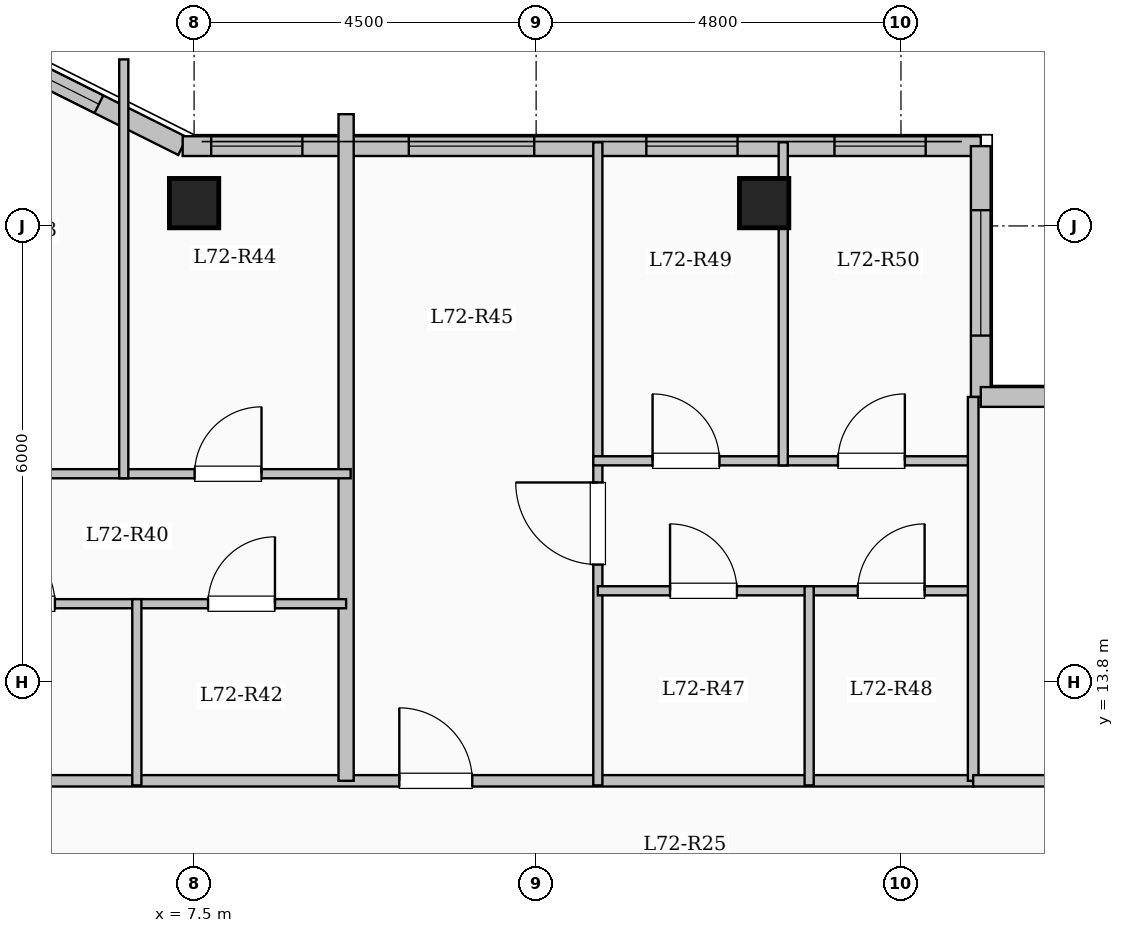
"""IFC4 building model, lengths in metres.
Left out: names, types, materials, properties, quantities, classifications, styles, units other than length and angle.
Written with IfcOpenShell. Run it as: python <this file> out.ifc"""

import sys

from ifc_helpers import new_model, si_unit, direction, frame, frame_2d, origin, origin_2d, place, context, subcontext, project, spatial, rectangle, extrude, element, fill, save


model = new_model("IFC4")
c1 = context("Model", 3, precision=1e-05, world=origin(), true_north=direction((0.0, 1.0)))
c2 = subcontext(c1, "Body", "Model", "MODEL_VIEW")
j1 = project(units=[si_unit("LENGTHUNIT", "METRE"), si_unit("PLANEANGLEUNIT", "RADIAN")], contexts=[c1])
p1 = place(None, origin())
s1 = spatial("IfcSite", under=j1, at=p1, CompositionType="ELEMENT")
p2 = place(p1, origin())
s2 = spatial("IfcBuilding", under=s1, at=p2, CompositionType="ELEMENT")
p3 = place(p2, frame((0.0, 0.0, 264.95)))
s3 = spatial("IfcBuildingStorey", under=s2, at=p3, CompositionType="ELEMENT", Elevation=264.95)
for number, where, z_axis, x_axis in (
    (1, (7.5, 20.1, 0.0), (0.0, 0.0, 1.0), (1.0, 0.0, 0.0)),
    (2, (15.0, 20.1, 0.0), (0.0, 0.0, 1.0), (1.0, 0.0, 0.0)),
):
    element("IfcColumn", number, at=place(p3, frame(where, z_axis=z_axis, x_axis=x_axis)), inside=s3, PredefinedType="COLUMN", context=c2, shape_type="SweptSolid", body=[
        extrude(rectangle(XDim=0.65, YDim=0.65, at=origin_2d()), origin(), (0.0, 0.0, 1.0), 3.35),
    ])
p4 = place(p3, frame((4.35, 22.35, 0.0), z_axis=(0.0, 0.0, 1.0), x_axis=(0.894427191, -0.4472135955, 0.0)))
e3 = element("IfcWall", 3, at=p4, inside=s3, PredefinedType="SOLIDWALL", context=c2, shape_type="SweptSolid", body=[
    extrude(rectangle(XDim=3.354, YDim=0.26, at=frame_2d((1.677, 0.0))), origin(), (0.0, 0.0, 1.0), 3.1),
])
p5 = place(p4, frame((0.772, 0.0, 0.95)))
e4 = element("IfcOpeningElement", 4, at=p5, cuts=e3, PredefinedType="OPENING", context=c2, shape_type="SweptSolid", body=[
    extrude(rectangle(XDim=1.35, YDim=1.55, at=frame_2d((0.675, 0.775))), frame((0.0, 0.14, 0.0), z_axis=(0.0, -1.0, 0.0), x_axis=(1.0, 0.0, 0.0)), (0.0, 0.0, 1.0), 0.28),
])
p6 = place(p3, frame((7.35, 20.85, 0.0), z_axis=(0.0, 0.0, 1.0), x_axis=(1.0, 0.0, 0.0)))
e5 = element("IfcWall", 5, at=p6, inside=s3, PredefinedType="SOLIDWALL", context=c2, shape_type="SweptSolid", body=[
    extrude(rectangle(XDim=10.5, YDim=0.26, at=frame_2d((5.25, 0.0))), origin(), (0.0, 0.0, 1.0), 3.1),
])
p7 = place(p6, frame((0.375, 0.0, 0.95)))
e6 = element("IfcOpeningElement", 6, at=p7, cuts=e5, PredefinedType="OPENING", context=c2, shape_type="SweptSolid", body=[
    extrude(rectangle(XDim=1.2, YDim=1.5, at=frame_2d((0.6, 0.75))), frame((0.0, 0.14, 0.0), z_axis=(0.0, -1.0, 0.0), x_axis=(1.0, 0.0, 0.0)), (0.0, 0.0, 1.0), 0.28),
])
p8 = place(p6, frame((2.975, 0.0, 0.9)))
e7 = element("IfcOpeningElement", 7, at=p8, cuts=e5, PredefinedType="OPENING", context=c2, shape_type="SweptSolid", body=[
    extrude(rectangle(XDim=1.65, YDim=1.6, at=frame_2d((0.825, 0.8))), frame((0.0, 0.14, 0.0), z_axis=(0.0, -1.0, 0.0), x_axis=(1.0, 0.0, 0.0)), (0.0, 0.0, 1.0), 0.28),
])
p9 = place(p6, frame((6.1, 0.0, 0.95)))
e8 = element("IfcOpeningElement", 8, at=p9, cuts=e5, PredefinedType="OPENING", context=c2, shape_type="SweptSolid", body=[
    extrude(rectangle(XDim=1.2, YDim=1.5, at=frame_2d((0.6, 0.75))), frame((0.0, 0.14, 0.0), z_axis=(0.0, -1.0, 0.0), x_axis=(1.0, 0.0, 0.0)), (0.0, 0.0, 1.0), 0.28),
])
p10 = place(p6, frame((8.575, 0.0, 0.95)))
e9 = element("IfcOpeningElement", 9, at=p10, cuts=e5, PredefinedType="OPENING", context=c2, shape_type="SweptSolid", body=[
    extrude(rectangle(XDim=1.2, YDim=1.5, at=frame_2d((0.6, 0.75))), frame((0.0, 0.14, 0.0), z_axis=(0.0, -1.0, 0.0), x_axis=(1.0, 0.0, 0.0)), (0.0, 0.0, 1.0), 0.28),
])
p11 = place(p3, frame((17.85, 20.85, 0.0), z_axis=(0.0, 0.0, 1.0), x_axis=(0.0, -1.0, 0.0)))
e10 = element("IfcWall", 10, at=p11, inside=s3, PredefinedType="SOLIDWALL", context=c2, shape_type="SweptSolid", body=[
    extrude(rectangle(XDim=3.3, YDim=0.26, at=frame_2d((1.65, 0.0))), origin(), (0.0, 0.0, 1.0), 3.1),
])
p12 = place(p11, frame((0.843, 0.0, 0.9)))
e11 = element("IfcOpeningElement", 11, at=p12, cuts=e10, PredefinedType="OPENING", context=c2, shape_type="SweptSolid", body=[
    extrude(rectangle(XDim=1.65, YDim=1.6, at=frame_2d((0.825, 0.8))), frame((0.0, 0.14, 0.0), z_axis=(0.0, -1.0, 0.0), x_axis=(1.0, 0.0, 0.0)), (0.0, 0.0, 1.0), 0.28),
])
p13 = place(p3, frame((17.85, 17.55, 0.0), z_axis=(0.0, 0.0, 1.0), x_axis=(1.0, 0.0, 0.0)))
e12 = element("IfcWall", 12, at=p13, inside=s3, PredefinedType="SOLIDWALL", context=c2, shape_type="SweptSolid", body=[
    extrude(rectangle(XDim=4.8, YDim=0.26, at=frame_2d((2.4, 0.0))), origin(), (0.0, 0.0, 1.0), 3.1),
])
p14 = place(p13, frame((1.375, 0.0, 0.9)))
e13 = element("IfcOpeningElement", 13, at=p14, cuts=e12, PredefinedType="OPENING", context=c2, shape_type="SweptSolid", body=[
    extrude(rectangle(XDim=2.0, YDim=1.7, at=frame_2d((1.0, 0.85))), frame((0.0, 0.14, 0.0), z_axis=(0.0, -1.0, 0.0), x_axis=(1.0, 0.0, 0.0)), (0.0, 0.0, 1.0), 0.28),
])
p15 = place(p3, frame((3.85, 12.5, 0.0), z_axis=(0.0, 0.0, 1.0), x_axis=(1.0, 0.0, 0.0)))
e14 = element("IfcWall", 14, at=p15, inside=s3, PredefinedType="PARTITIONING", context=c2, shape_type="SweptSolid", body=[
    extrude(rectangle(XDim=13.9, YDim=0.15, at=frame_2d((6.95, 0.0))), origin(), (0.0, 0.0, 1.0), 3.1),
])
p16 = place(p15, frame((0.7, 0.0, 0.0)))
e15 = element("IfcOpeningElement", 15, at=p16, cuts=e14, PredefinedType="OPENING", context=c2, shape_type="SweptSolid", body=[
    extrude(rectangle(XDim=0.96, YDim=2.15, at=frame_2d((0.48, 1.075))), frame((0.0, 0.085, 0.0), z_axis=(0.0, -1.0, 0.0), x_axis=(1.0, 0.0, 0.0)), (0.0, 0.0, 1.0), 0.17),
])
p17 = place(p15, frame((6.35, 0.0, 0.0)))
e16 = element("IfcOpeningElement", 16, at=p17, cuts=e14, PredefinedType="OPENING", context=c2, shape_type="SweptSolid", body=[
    extrude(rectangle(XDim=0.96, YDim=2.15, at=frame_2d((0.48, 1.075))), frame((0.0, 0.085, 0.0), z_axis=(0.0, -1.0, 0.0), x_axis=(1.0, 0.0, 0.0)), (0.0, 0.0, 1.0), 0.17),
])
p18 = place(p3, frame((9.5, 12.5, 0.0), z_axis=(0.0, 0.0, 1.0), x_axis=(0.0, 1.0, 0.0)))
e17 = element("IfcWall", 17, at=p18, inside=s3, PredefinedType="SOLIDWALL", context=c2, shape_type="SweptSolid", body=[
    extrude(rectangle(XDim=8.77, YDim=0.2, at=frame_2d((4.385, 0.0))), origin(), (0.0, 0.0, 1.0), 3.1),
])
p19 = place(p3, frame((3.71, 14.83, 0.0), z_axis=(0.0, 0.0, 1.0), x_axis=(1.0, 0.0, 0.0)))
e18 = element("IfcWall", 18, at=p19, inside=s3, PredefinedType="PARTITIONING", context=c2, shape_type="SweptSolid", body=[
    extrude(rectangle(XDim=3.037, YDim=0.12, at=frame_2d((1.519, 0.0))), origin(), (0.0, 0.0, 1.0), 3.1),
])
p20 = place(p19, frame((1.079, 0.0, 0.0)))
e19 = element("IfcOpeningElement", 19, at=p20, cuts=e18, PredefinedType="OPENING", context=c2, shape_type="SweptSolid", body=[
    extrude(rectangle(XDim=0.88, YDim=2.1, at=frame_2d((0.44, 1.05))), frame((0.0, 0.07, 0.0), z_axis=(0.0, -1.0, 0.0), x_axis=(1.0, 0.0, 0.0)), (0.0, 0.0, 1.0), 0.14),
])
p21 = place(p3, frame((6.747, 14.83, 0.0), z_axis=(0.0, 0.0, 1.0), x_axis=(1.0, 0.0, 0.0)))
e20 = element("IfcWall", 20, at=p21, inside=s3, PredefinedType="PARTITIONING", context=c2, shape_type="SweptSolid", body=[
    extrude(rectangle(XDim=2.753, YDim=0.12, at=frame_2d((1.376, 0.0))), origin(), (0.0, 0.0, 1.0), 3.1),
])
p22 = place(p21, frame((0.937, 0.0, 0.0)))
e21 = element("IfcOpeningElement", 21, at=p22, cuts=e20, PredefinedType="OPENING", context=c2, shape_type="SweptSolid", body=[
    extrude(rectangle(XDim=0.88, YDim=2.1, at=frame_2d((0.44, 1.05))), frame((0.0, 0.07, 0.0), z_axis=(0.0, -1.0, 0.0), x_axis=(1.0, 0.0, 0.0)), (0.0, 0.0, 1.0), 0.14),
])
p23 = place(p3, frame((3.65, 16.54, 0.0), z_axis=(0.0, 0.0, 1.0), x_axis=(1.0, 0.0, 0.0)))
e22 = element("IfcWall", 22, at=p23, inside=s3, PredefinedType="PARTITIONING", context=c2, shape_type="SweptSolid", body=[
    extrude(rectangle(XDim=5.91, YDim=0.12, at=frame_2d((2.955, 0.0))), origin(), (0.0, 0.0, 1.0), 3.1),
])
p24 = place(p23, frame((0.992, 0.0, 0.0)))
e23 = element("IfcOpeningElement", 23, at=p24, cuts=e22, PredefinedType="OPENING", context=c2, shape_type="SweptSolid", body=[
    extrude(rectangle(XDim=0.88, YDim=2.1, at=frame_2d((0.44, 1.05))), frame((0.0, 0.07, 0.0), z_axis=(0.0, -1.0, 0.0), x_axis=(1.0, 0.0, 0.0)), (0.0, 0.0, 1.0), 0.14),
])
p25 = place(p23, frame((3.857, 0.0, 0.0)))
e24 = element("IfcOpeningElement", 24, at=p25, cuts=e22, PredefinedType="OPENING", context=c2, shape_type="SweptSolid", body=[
    extrude(rectangle(XDim=0.88, YDim=2.1, at=frame_2d((0.44, 1.05))), frame((0.0, 0.07, 0.0), z_axis=(0.0, -1.0, 0.0), x_axis=(1.0, 0.0, 0.0)), (0.0, 0.0, 1.0), 0.14),
])
p26 = place(p3, frame((6.747, 12.44, 0.0), z_axis=(0.0, 0.0, 1.0), x_axis=(0.0, 1.0, 0.0)))
e25 = element("IfcWall", 25, at=p26, inside=s3, PredefinedType="PARTITIONING", context=c2, shape_type="SweptSolid", body=[
    extrude(rectangle(XDim=2.45, YDim=0.12, at=frame_2d((1.225, 0.0))), origin(), (0.0, 0.0, 1.0), 3.1),
])
p27 = place(p3, frame((6.575, 16.48, 0.0), z_axis=(0.0, 0.0, 1.0), x_axis=(0.0, 1.0, 0.0)))
e26 = element("IfcWall", 26, at=p27, inside=s3, PredefinedType="PARTITIONING", context=c2, shape_type="SweptSolid", body=[
    extrude(rectangle(XDim=5.511, YDim=0.12, at=frame_2d((2.755, 0.0))), origin(), (0.0, 0.0, 1.0), 3.1),
])
p28 = place(p3, frame((12.812, 12.44, 0.0), z_axis=(0.0, 0.0, 1.0), x_axis=(0.0, 1.0, 0.0)))
e27 = element("IfcWall", 27, at=p28, inside=s3, PredefinedType="PARTITIONING", context=c2, shape_type="SweptSolid", body=[
    extrude(rectangle(XDim=8.46, YDim=0.12, at=frame_2d((4.23, 0.0))), origin(), (0.0, 0.0, 1.0), 3.1),
])
p29 = place(p28, frame((2.905, 0.0, 0.0)))
e28 = element("IfcOpeningElement", 28, at=p29, cuts=e27, PredefinedType="OPENING", context=c2, shape_type="SweptSolid", body=[
    extrude(rectangle(XDim=1.08, YDim=2.15, at=frame_2d((0.54, 1.075))), frame((0.0, 0.07, 0.0), z_axis=(0.0, -1.0, 0.0), x_axis=(1.0, 0.0, 0.0)), (0.0, 0.0, 1.0), 0.14),
])
p30 = place(p3, frame((12.812, 15.0, 0.0), z_axis=(0.0, 0.0, 1.0), x_axis=(1.0, 0.0, 0.0)))
e29 = element("IfcWall", 29, at=p30, inside=s3, PredefinedType="PARTITIONING", context=c2, shape_type="SweptSolid", body=[
    extrude(rectangle(XDim=2.78, YDim=0.12, at=frame_2d((1.39, 0.0))), origin(), (0.0, 0.0, 1.0), 3.1),
])
p31 = place(p30, frame((0.95, 0.0, 0.0)))
e30 = element("IfcOpeningElement", 30, at=p31, cuts=e29, PredefinedType="OPENING", context=c2, shape_type="SweptSolid", body=[
    extrude(rectangle(XDim=0.88, YDim=2.1, at=frame_2d((0.44, 1.05))), frame((0.0, 0.07, 0.0), z_axis=(0.0, -1.0, 0.0), x_axis=(1.0, 0.0, 0.0)), (0.0, 0.0, 1.0), 0.14),
])
p32 = place(p3, frame((15.592, 15.0, 0.0), z_axis=(0.0, 0.0, 1.0), x_axis=(1.0, 0.0, 0.0)))
e31 = element("IfcWall", 31, at=p32, inside=s3, PredefinedType="PARTITIONING", context=c2, shape_type="SweptSolid", body=[
    extrude(rectangle(XDim=2.158, YDim=0.12, at=frame_2d((1.079, 0.0))), origin(), (0.0, 0.0, 1.0), 3.1),
])
p33 = place(p32, frame((0.639, 0.0, 0.0)))
e32 = element("IfcOpeningElement", 32, at=p33, cuts=e31, PredefinedType="OPENING", context=c2, shape_type="SweptSolid", body=[
    extrude(rectangle(XDim=0.88, YDim=2.1, at=frame_2d((0.44, 1.05))), frame((0.0, 0.07, 0.0), z_axis=(0.0, -1.0, 0.0), x_axis=(1.0, 0.0, 0.0)), (0.0, 0.0, 1.0), 0.14),
])
p34 = place(p3, frame((12.752, 16.71, 0.0), z_axis=(0.0, 0.0, 1.0), x_axis=(1.0, 0.0, 0.0)))
e33 = element("IfcWall", 33, at=p34, inside=s3, PredefinedType="PARTITIONING", context=c2, shape_type="SweptSolid", body=[
    extrude(rectangle(XDim=5.058, YDim=0.12, at=frame_2d((2.529, 0.0))), origin(), (0.0, 0.0, 1.0), 2.785),
])
p35 = place(p34, frame((0.78, 0.0, 0.0)))
e34 = element("IfcOpeningElement", 34, at=p35, cuts=e33, PredefinedType="OPENING", context=c2, shape_type="SweptSolid", body=[
    extrude(rectangle(XDim=0.88, YDim=2.1, at=frame_2d((0.44, 1.05))), frame((0.0, 0.07, 0.0), z_axis=(0.0, -1.0, 0.0), x_axis=(1.0, 0.0, 0.0)), (0.0, 0.0, 1.0), 0.14),
])
p36 = place(p34, frame((3.219, 0.0, 0.0)))
e35 = element("IfcOpeningElement", 35, at=p36, cuts=e33, PredefinedType="OPENING", context=c2, shape_type="SweptSolid", body=[
    extrude(rectangle(XDim=0.88, YDim=2.1, at=frame_2d((0.44, 1.05))), frame((0.0, 0.07, 0.0), z_axis=(0.0, -1.0, 0.0), x_axis=(1.0, 0.0, 0.0)), (0.0, 0.0, 1.0), 0.14),
])
p37 = place(p3, frame((15.592, 12.44, 0.0), z_axis=(0.0, 0.0, 1.0), x_axis=(0.0, 1.0, 0.0)))
e36 = element("IfcWall", 36, at=p37, inside=s3, PredefinedType="PARTITIONING", context=c2, shape_type="SweptSolid", body=[
    extrude(rectangle(XDim=2.62, YDim=0.12, at=frame_2d((1.31, 0.0))), origin(), (0.0, 0.0, 1.0), 3.1),
])
p38 = place(p3, frame((15.251, 16.65, 0.0), z_axis=(0.0, 0.0, 1.0), x_axis=(0.0, 1.0, 0.0)))
e37 = element("IfcWall", 37, at=p38, inside=s3, PredefinedType="PARTITIONING", context=c2, shape_type="SweptSolid", body=[
    extrude(rectangle(XDim=4.25, YDim=0.12, at=frame_2d((2.125, 0.0))), origin(), (0.0, 0.0, 1.0), 2.685),
])
p39 = place(p3, frame((17.75, 12.5, 0.0), z_axis=(0.0, 0.0, 1.0), x_axis=(0.0, 1.0, 0.0)))
e38 = element("IfcWall", 38, at=p39, inside=s3, PredefinedType="PARTITIONING", context=c2, shape_type="SweptSolid", body=[
    extrude(rectangle(XDim=5.05, YDim=0.14, at=frame_2d((2.525, 0.0))), origin(), (0.0, 0.0, 1.0), 3.1),
])
p40 = place(p3, frame((17.75, 12.5, 0.0), z_axis=(0.0, 0.0, 1.0), x_axis=(1.0, 0.0, 0.0)))
e39 = element("IfcWall", 39, at=p40, inside=s3, PredefinedType="PARTITIONING", context=c2, shape_type="SweptSolid", body=[
    extrude(rectangle(XDim=4.93, YDim=0.15, at=frame_2d((2.465, 0.0))), origin(), (0.0, 0.0, 1.0), 3.1),
])
p41 = place(p40, frame((1.99, 0.0, 0.0)))
e40 = element("IfcOpeningElement", 40, at=p41, cuts=e39, PredefinedType="OPENING", context=c2, shape_type="SweptSolid", body=[
    extrude(rectangle(XDim=0.95, YDim=2.15, at=frame_2d((0.475, 1.075))), frame((0.0, 0.085, 0.0), z_axis=(0.0, -1.0, 0.0), x_axis=(1.0, 0.0, 0.0)), (0.0, 0.0, 1.0), 0.17),
])
p42 = place(p5, origin())
e41 = element("IfcWindow", 41, at=p42, inside=s3, PartitioningType="SINGLE_PANEL", PredefinedType="WINDOW", context=c2, shape_type="SweptSolid", body=[
    extrude(rectangle(XDim=1.35, YDim=1.55, at=frame_2d((0.675, 0.775))), frame((0.0, 0.03, 0.0), z_axis=(0.0, -1.0, 0.0), x_axis=(1.0, 0.0, 0.0)), (0.0, 0.0, 1.0), 0.06),
])
fill(e4, e41)
p43 = place(p7, origin())
e42 = element("IfcWindow", 42, at=p43, inside=s3, PartitioningType="SINGLE_PANEL", PredefinedType="WINDOW", context=c2, shape_type="SweptSolid", body=[
    extrude(rectangle(XDim=1.2, YDim=1.5, at=frame_2d((0.6, 0.75))), frame((0.0, 0.03, 0.0), z_axis=(0.0, -1.0, 0.0), x_axis=(1.0, 0.0, 0.0)), (0.0, 0.0, 1.0), 0.06),
])
fill(e6, e42)
p44 = place(p8, origin())
e43 = element("IfcWindow", 43, at=p44, inside=s3, PartitioningType="SINGLE_PANEL", PredefinedType="WINDOW", context=c2, shape_type="SweptSolid", body=[
    extrude(rectangle(XDim=1.65, YDim=1.6, at=frame_2d((0.825, 0.8))), frame((0.0, 0.03, 0.0), z_axis=(0.0, -1.0, 0.0), x_axis=(1.0, 0.0, 0.0)), (0.0, 0.0, 1.0), 0.06),
])
fill(e7, e43)
p45 = place(p9, origin())
e44 = element("IfcWindow", 44, at=p45, inside=s3, PartitioningType="SINGLE_PANEL", PredefinedType="WINDOW", context=c2, shape_type="SweptSolid", body=[
    extrude(rectangle(XDim=1.2, YDim=1.5, at=frame_2d((0.6, 0.75))), frame((0.0, 0.03, 0.0), z_axis=(0.0, -1.0, 0.0), x_axis=(1.0, 0.0, 0.0)), (0.0, 0.0, 1.0), 0.06),
])
fill(e8, e44)
p46 = place(p10, origin())
e45 = element("IfcWindow", 45, at=p46, inside=s3, PartitioningType="SINGLE_PANEL", PredefinedType="WINDOW", context=c2, shape_type="SweptSolid", body=[
    extrude(rectangle(XDim=1.2, YDim=1.5, at=frame_2d((0.6, 0.75))), frame((0.0, 0.03, 0.0), z_axis=(0.0, -1.0, 0.0), x_axis=(1.0, 0.0, 0.0)), (0.0, 0.0, 1.0), 0.06),
])
fill(e9, e45)
p47 = place(p12, origin())
e46 = element("IfcWindow", 46, at=p47, inside=s3, PartitioningType="SINGLE_PANEL", PredefinedType="WINDOW", context=c2, shape_type="SweptSolid", body=[
    extrude(rectangle(XDim=1.65, YDim=1.6, at=frame_2d((0.825, 0.8))), frame((0.0, 0.03, 0.0), z_axis=(0.0, -1.0, 0.0), x_axis=(1.0, 0.0, 0.0)), (0.0, 0.0, 1.0), 0.06),
])
fill(e11, e46)
p48 = place(p20, origin())
e47 = element("IfcDoor", 47, at=p48, inside=s3, OperationType="SINGLE_SWING_LEFT", PredefinedType="DOOR", context=c2, shape_type="SweptSolid", body=[
    extrude(rectangle(XDim=0.88, YDim=2.1, at=frame_2d((0.44, 1.05))), frame((0.0, 0.025, 0.0), z_axis=(0.0, -1.0, 0.0), x_axis=(1.0, 0.0, 0.0)), (0.0, 0.0, 1.0), 0.05),
])
fill(e19, e47)
p49 = place(p22, origin())
e48 = element("IfcDoor", 48, at=p49, inside=s3, OperationType="SINGLE_SWING_RIGHT", PredefinedType="DOOR", context=c2, shape_type="SweptSolid", body=[
    extrude(rectangle(XDim=0.88, YDim=2.1, at=frame_2d((0.44, 1.05))), frame((0.0, 0.025, 0.0), z_axis=(0.0, -1.0, 0.0), x_axis=(1.0, 0.0, 0.0)), (0.0, 0.0, 1.0), 0.05),
])
fill(e21, e48)
p50 = place(p25, origin())
e49 = element("IfcDoor", 49, at=p50, inside=s3, OperationType="SINGLE_SWING_RIGHT", PredefinedType="DOOR", context=c2, shape_type="SweptSolid", body=[
    extrude(rectangle(XDim=0.88, YDim=2.1, at=frame_2d((0.44, 1.05))), frame((0.0, 0.025, 0.0), z_axis=(0.0, -1.0, 0.0), x_axis=(1.0, 0.0, 0.0)), (0.0, 0.0, 1.0), 0.05),
])
fill(e24, e49)
p51 = place(p17, origin())
e50 = element("IfcDoor", 50, at=p51, inside=s3, OperationType="SINGLE_SWING_LEFT", PredefinedType="DOOR", context=c2, shape_type="SweptSolid", body=[
    extrude(rectangle(XDim=0.96, YDim=2.15, at=frame_2d((0.48, 1.075))), frame((0.0, 0.025, 0.0), z_axis=(0.0, -1.0, 0.0), x_axis=(1.0, 0.0, 0.0)), (0.0, 0.0, 1.0), 0.05),
])
fill(e16, e50)
p52 = place(p29, origin())
e51 = element("IfcDoor", 51, at=p52, inside=s3, OperationType="SINGLE_SWING_RIGHT", PredefinedType="DOOR", context=c2, shape_type="SweptSolid", body=[
    extrude(rectangle(XDim=1.08, YDim=2.15, at=frame_2d((0.54, 1.075))), frame((0.0, 0.025, 0.0), z_axis=(0.0, -1.0, 0.0), x_axis=(1.0, 0.0, 0.0)), (0.0, 0.0, 1.0), 0.05),
])
fill(e28, e51)
p53 = place(p31, origin())
e52 = element("IfcDoor", 52, at=p53, inside=s3, OperationType="SINGLE_SWING_LEFT", PredefinedType="DOOR", context=c2, shape_type="SweptSolid", body=[
    extrude(rectangle(XDim=0.88, YDim=2.1, at=frame_2d((0.44, 1.05))), frame((0.0, 0.025, 0.0), z_axis=(0.0, -1.0, 0.0), x_axis=(1.0, 0.0, 0.0)), (0.0, 0.0, 1.0), 0.05),
])
fill(e30, e52)
p54 = place(p33, origin())
e53 = element("IfcDoor", 53, at=p54, inside=s3, OperationType="SINGLE_SWING_RIGHT", PredefinedType="DOOR", context=c2, shape_type="SweptSolid", body=[
    extrude(rectangle(XDim=0.88, YDim=2.1, at=frame_2d((0.44, 1.05))), frame((0.0, 0.025, 0.0), z_axis=(0.0, -1.0, 0.0), x_axis=(1.0, 0.0, 0.0)), (0.0, 0.0, 1.0), 0.05),
])
fill(e32, e53)
p55 = place(p35, origin())
e54 = element("IfcDoor", 54, at=p55, inside=s3, OperationType="SINGLE_SWING_LEFT", PredefinedType="DOOR", context=c2, shape_type="SweptSolid", body=[
    extrude(rectangle(XDim=0.88, YDim=2.1, at=frame_2d((0.44, 1.05))), frame((0.0, 0.025, 0.0), z_axis=(0.0, -1.0, 0.0), x_axis=(1.0, 0.0, 0.0)), (0.0, 0.0, 1.0), 0.05),
])
fill(e34, e54)
p56 = place(p36, origin())
e55 = element("IfcDoor", 55, at=p56, inside=s3, OperationType="SINGLE_SWING_RIGHT", PredefinedType="DOOR", context=c2, shape_type="SweptSolid", body=[
    extrude(rectangle(XDim=0.88, YDim=2.1, at=frame_2d((0.44, 1.05))), frame((0.0, 0.025, 0.0), z_axis=(0.0, -1.0, 0.0), x_axis=(1.0, 0.0, 0.0)), (0.0, 0.0, 1.0), 0.05),
])
fill(e35, e55)
save(model, sys.argv[1])
